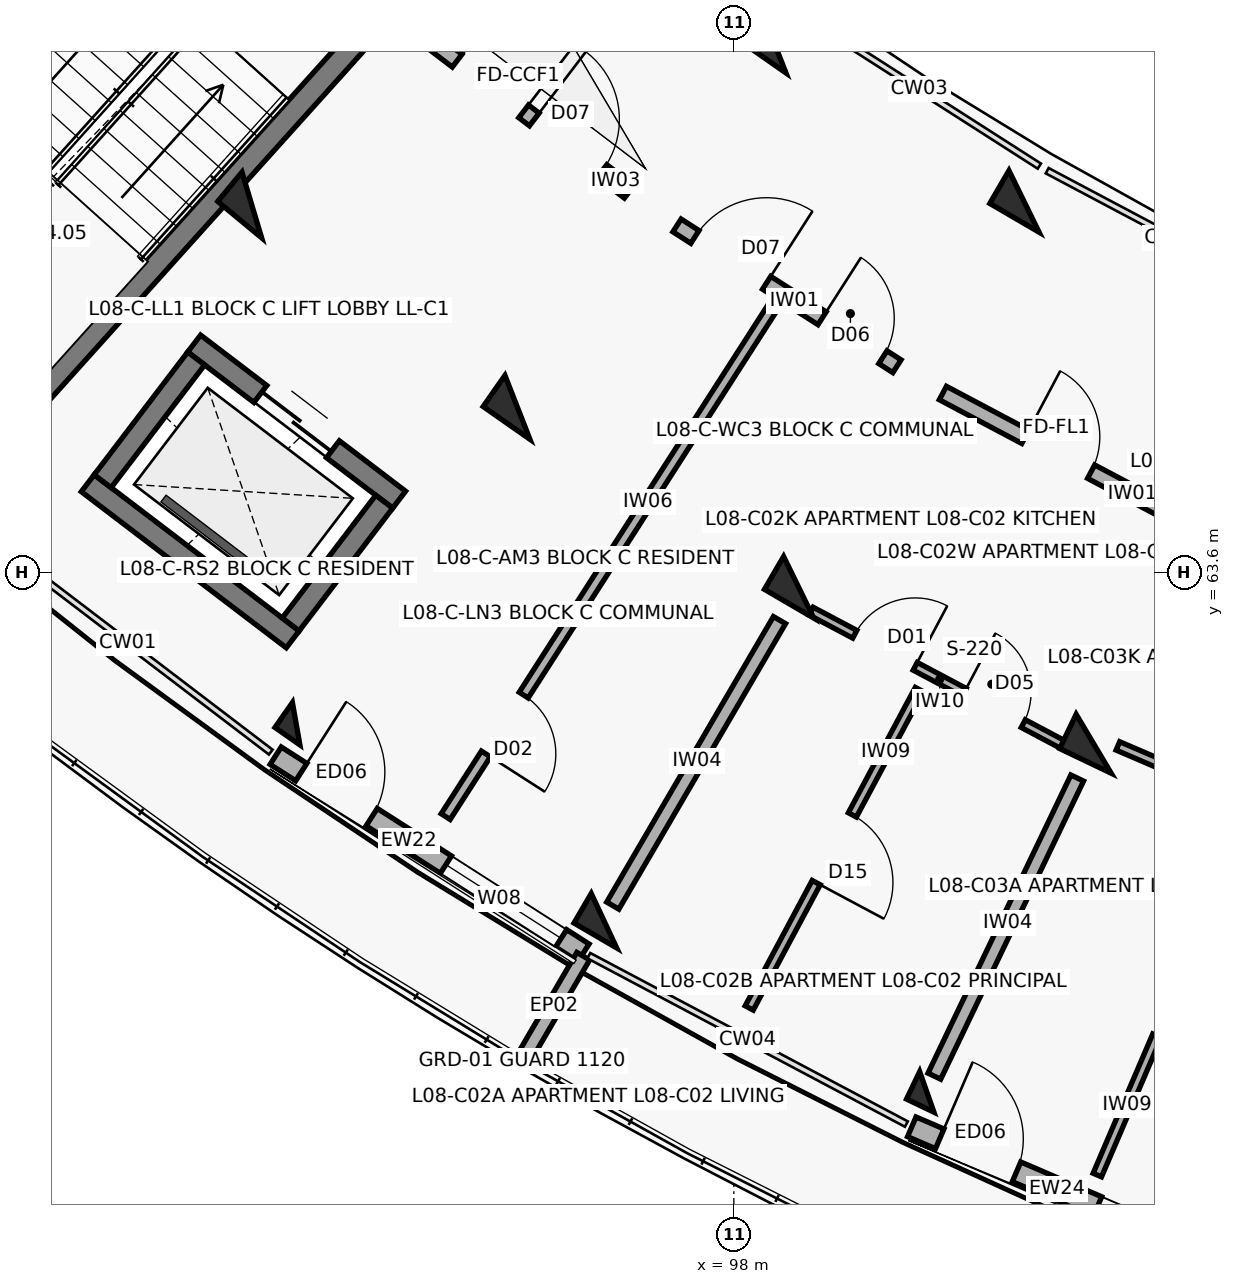
"""IFC4 building model, lengths in metres.
Left out: names, types, materials, properties, quantities, classifications, styles, units other than length and angle.
Written with IfcOpenShell. Run it as: python <this file> out.ifc"""

import sys

from ifc_helpers import new_model, si_unit, direction, frame, frame_2d, origin, origin_2d, place, context, subcontext, project, spatial, rectangle, extrude, element, fill, save


model = new_model("IFC4")
c1 = context("Model", 3, precision=1e-05, world=origin(), true_north=direction((0.0, 1.0)))
c2 = subcontext(c1, "Body", "Model", "MODEL_VIEW")
j1 = project(units=[si_unit("LENGTHUNIT", "METRE"), si_unit("PLANEANGLEUNIT", "RADIAN")], contexts=[c1])
p1 = place(None, origin())
s1 = spatial("IfcSite", under=j1, at=p1, CompositionType="ELEMENT")
p2 = place(p1, origin())
s2 = spatial("IfcBuilding", under=s1, at=p2, CompositionType="ELEMENT")
p3 = place(p2, frame((0.0, 0.0, 26.7)))
s3 = spatial("IfcBuildingStorey", under=s2, at=p3, CompositionType="ELEMENT", Elevation=26.7)
for number, where, z_axis, x_axis in (
    (1, (91.658, 68.43, 0.0), (0.0, 0.0, 1.0), (-0.638, -0.77, 0.0)),
    (2, (98.522, 70.587, 0.0), (0.0, 0.0, 1.0), (-0.573, -0.82, 0.0)),
    (3, (95.152, 65.768, 0.0), (0.0, 0.0, 1.0), (-0.573, -0.82, 0.0)),
):
    element("IfcColumn", number, at=place(p3, frame(where, z_axis=z_axis, x_axis=x_axis)), inside=s3, PredefinedType="COLUMN", context=c2, shape_type="SweptSolid", body=[
        extrude(rectangle(XDim=0.5, YDim=0.75, at=origin_2d()), origin(), (0.0, 0.0, 1.0), 3.1),
    ])
p4 = place(p3, frame((92.241, 61.605, 0.0), z_axis=(0.0, 0.0, 1.0), x_axis=(-0.573004420611, -0.819552276527, 0.0)))
e4 = element("IfcColumn", 4, at=p4, inside=s3, PredefinedType="COLUMN", context=c2, shape_type="SweptSolid", body=[
    extrude(rectangle(XDim=0.4, YDim=0.4, at=origin_2d()), origin(), (0.0, 0.0, 1.0), 3.1),
])
for number, where, z_axis, x_axis in (
    (5, (101.817, 68.478, 0.0), (0.0, 0.0, 1.0), (-0.504, -0.864, 0.0)),
    (6, (98.853, 63.4, 0.0), (0.0, 0.0, 1.0), (-0.504, -0.864, 0.0)),
):
    element("IfcColumn", number, at=place(p3, frame(where, z_axis=z_axis, x_axis=x_axis)), inside=s3, PredefinedType="COLUMN", context=c2, shape_type="SweptSolid", body=[
        extrude(rectangle(XDim=0.5, YDim=0.75, at=origin_2d()), origin(), (0.0, 0.0, 1.0), 3.1),
    ])
p5 = place(p3, frame((96.291, 59.013, 0.0), z_axis=(0.0, 0.0, 1.0), x_axis=(-0.504226211181, -0.863571611366, 0.0)))
e7 = element("IfcColumn", 7, at=p5, inside=s3, PredefinedType="COLUMN", context=c2, shape_type="SweptSolid", body=[
    extrude(rectangle(XDim=0.45, YDim=0.65, at=origin_2d()), origin(), (0.0, 0.0, 1.0), 3.1),
])
p6 = place(p3, frame((102.734, 61.341, 0.0), z_axis=(0.0, 0.0, 1.0), x_axis=(-0.432085748802, -0.901832526405, 0.0)))
e8 = element("IfcColumn", 8, at=p6, inside=s3, PredefinedType="COLUMN", context=c2, shape_type="SweptSolid", body=[
    extrude(rectangle(XDim=0.5, YDim=0.75, at=origin_2d()), origin(), (0.0, 0.0, 1.0), 3.1),
])
p7 = place(p3, frame((100.539, 56.76, 0.0), z_axis=(0.0, 0.0, 1.0), x_axis=(-0.432085748802, -0.901832526405, 0.0)))
e9 = element("IfcColumn", 9, at=p7, inside=s3, PredefinedType="COLUMN", context=c2, shape_type="SweptSolid", body=[
    extrude(rectangle(XDim=0.4, YDim=0.4, at=origin_2d()), origin(), (0.0, 0.0, 1.0), 3.1),
])
p8 = place(p3, frame((91.972, 61.184, 0.0), z_axis=(0.0, 0.0, 1.0), x_axis=(0.84226218024, -0.539068103061, 0.0)))
e10 = element("IfcWall", 10, at=p8, inside=s3, PredefinedType="SOLIDWALL", context=c2, shape_type="SweptSolid", body=[
    extrude(rectangle(XDim=4.809, YDim=0.272, at=frame_2d((2.404, 0.0))), origin(), (0.0, 0.0, 1.0), 2.25),
])
p9 = place(p8, frame((0.4, 0.0, 0.0)))
e11 = element("IfcOpeningElement", 11, at=p9, cuts=e10, PredefinedType="OPENING", context=c2, shape_type="SweptSolid", body=[
    extrude(rectangle(XDim=1.1, YDim=2.15, at=frame_2d((0.55, 1.075))), frame((0.0, 0.146, 0.0), z_axis=(0.0, -1.0, 0.0), x_axis=(1.0, 0.0, 0.0)), (0.0, 0.0, 1.0), 0.292),
])
p10 = place(p8, frame((2.659, 0.0, 0.35)))
e12 = element("IfcOpeningElement", 12, at=p10, cuts=e10, PredefinedType="OPENING", context=c2, shape_type="SweptSolid", body=[
    extrude(rectangle(XDim=1.8, YDim=1.65, at=frame_2d((0.9, 0.825))), frame((0.0, 0.146, 0.0), z_axis=(0.0, -1.0, 0.0), x_axis=(1.0, 0.0, 0.0)), (0.0, 0.0, 1.0), 0.292),
])
p11 = place(p3, frame((96.019, 58.547, 0.0), z_axis=(0.0, 0.0, 1.0), x_axis=(-0.504228145431, -0.863570481985, 0.0)))
e13 = element("IfcWall", 13, at=p11, inside=s3, PredefinedType="PARAPET", context=c2, shape_type="SweptSolid", body=[
    extrude(rectangle(XDim=1.53, YDim=0.195, at=frame_2d((0.765, 0.0))), origin(), (0.0, 0.0, 1.0), 2.25),
])
p12 = place(p3, frame((100.341, 56.301, 0.0), z_axis=(0.0, 0.0, 1.0), x_axis=(0.918737524932, -0.39486878869, 0.0)))
e14 = element("IfcWall", 14, at=p12, inside=s3, PredefinedType="SOLIDWALL", context=c2, shape_type="SweptSolid", body=[
    extrude(rectangle(XDim=4.809, YDim=0.282, at=frame_2d((2.405, 0.0))), origin(), (0.0, 0.0, 1.0), 2.25),
])
p13 = place(p12, frame((0.4, 0.0, 0.0)))
e15 = element("IfcOpeningElement", 15, at=p13, cuts=e14, PredefinedType="OPENING", context=c2, shape_type="SweptSolid", body=[
    extrude(rectangle(XDim=1.1, YDim=2.15, at=frame_2d((0.55, 1.075))), frame((0.0, 0.151, 0.0), z_axis=(0.0, -1.0, 0.0), x_axis=(1.0, 0.0, 0.0)), (0.0, 0.0, 1.0), 0.302),
])
p14 = place(p12, frame((2.659, 0.0, 0.35)))
e16 = element("IfcOpeningElement", 16, at=p14, cuts=e14, PredefinedType="OPENING", context=c2, shape_type="SweptSolid", body=[
    extrude(rectangle(XDim=1.8, YDim=1.65, at=frame_2d((0.9, 0.825))), frame((0.0, 0.151, 0.0), z_axis=(0.0, -1.0, 0.0), x_axis=(1.0, 0.0, 0.0)), (0.0, 0.0, 1.0), 0.302),
])
p15 = place(p3, frame((90.671, 73.287, 0.0), z_axis=(0.0, 0.0, 1.0), x_axis=(-0.668885797871, -0.743365179038, 0.0)))
e17 = element("IfcWall", 17, at=p15, inside=s3, PredefinedType="SHEAR", context=c2, shape_type="SweptSolid", body=[
    extrude(rectangle(XDim=7.69, YDim=0.3, at=frame_2d((3.845, 0.0))), origin(), (0.0, 0.0, 1.0), 3.1),
])
p16 = place(p3, frame((93.325, 70.899, 0.0), z_axis=(0.0, 0.0, 1.0), x_axis=(-0.668868253964, -0.743380964808, 0.0)))
e18 = element("IfcWall", 18, at=p16, inside=s3, PredefinedType="SHEAR", context=c2, shape_type="SweptSolid", body=[
    extrude(rectangle(XDim=7.69, YDim=0.3, at=frame_2d((3.845, 0.0))), origin(), (0.0, 0.0, 1.0), 3.1),
])
p17 = place(p3, frame((90.899, 66.607, 0.0), z_axis=(0.0, 0.0, 1.0), x_axis=(0.795439986025, -0.606032365994, 0.0)))
e19 = element("IfcWall", 19, at=p17, inside=s3, PredefinedType="SHEAR", context=c2, shape_type="SweptSolid", body=[
    extrude(rectangle(XDim=3.39, YDim=0.28, at=frame_2d((1.695, 0.0))), origin(), (0.0, 0.0, 1.0), 3.1),
])
p18 = place(p17, frame((1.095, 0.0, 0.0)))
e20 = element("IfcOpeningElement", 20, at=p18, cuts=e19, PredefinedType="OPENING", context=c2, shape_type="SweptSolid", body=[
    extrude(rectangle(XDim=1.2, YDim=2.15, at=frame_2d((0.6, 1.075))), frame((0.0, 0.15, 0.0), z_axis=(0.0, -1.0, 0.0), x_axis=(1.0, 0.0, 0.0)), (0.0, 0.0, 1.0), 0.3),
])
p19 = place(p3, frame((89.5, 64.77, 0.0), z_axis=(0.0, 0.0, 1.0), x_axis=(0.795474703455, -0.605986795371, 0.0)))
e21 = element("IfcWall", 21, at=p19, inside=s3, PredefinedType="SHEAR", context=c2, shape_type="SweptSolid", body=[
    extrude(rectangle(XDim=3.39, YDim=0.28, at=frame_2d((1.695, 0.0))), origin(), (0.0, 0.0, 1.0), 3.1),
])
p20 = place(p3, frame((90.926, 66.411, 0.0), z_axis=(0.0, 0.0, 1.0), x_axis=(-0.605948992168, -0.795503500238, 0.0)))
e22 = element("IfcWall", 22, at=p20, inside=s3, PredefinedType="SHEAR", context=c2, shape_type="SweptSolid", body=[
    extrude(rectangle(XDim=2.03, YDim=0.28, at=frame_2d((1.015, 0.0))), origin(), (0.0, 0.0, 1.0), 3.1),
])
p21 = place(p3, frame((93.4, 64.526, 0.0), z_axis=(0.0, 0.0, 1.0), x_axis=(-0.605891019062, -0.795547656033, 0.0)))
e23 = element("IfcWall", 23, at=p21, inside=s3, PredefinedType="SHEAR", context=c2, shape_type="SweptSolid", body=[
    extrude(rectangle(XDim=2.03, YDim=0.28, at=frame_2d((1.015, 0.0))), origin(), (0.0, 0.0, 1.0), 3.1),
])
p22 = place(p3, frame((94.001, 70.602, 0.0), z_axis=(0.0, 0.0, 1.0), x_axis=(0.795498026433, -0.605956178235, 0.0)))
e24 = element("IfcWall", 24, at=p22, inside=s3, PredefinedType="SOLIDWALL", context=c2, shape_type="SweptSolid", body=[
    extrude(rectangle(XDim=3.296, YDim=0.21, at=frame_2d((1.648, 0.0))), origin(), (0.0, 0.0, 1.0), 2.08),
])
p23 = place(p22, frame((0.45, 0.0, 0.0)))
e25 = element("IfcOpeningElement", 25, at=p23, cuts=e24, PredefinedType="OPENING", context=c2, shape_type="SweptSolid", body=[
    extrude(rectangle(XDim=1.1, YDim=2.15, at=frame_2d((0.55, 1.075))), frame((0.0, 0.115, 0.0), z_axis=(0.0, -1.0, 0.0), x_axis=(1.0, 0.0, 0.0)), (0.0, 0.0, 1.0), 0.23),
])
p24 = place(p22, frame((1.726, 0.0, 0.0)))
e26 = element("IfcOpeningElement", 26, at=p24, cuts=e24, PredefinedType="OPENING", context=c2, shape_type="SweptSolid", body=[
    extrude(rectangle(XDim=1.12, YDim=2.15, at=frame_2d((0.56, 1.075))), frame((0.0, 0.115, 0.0), z_axis=(0.0, -1.0, 0.0), x_axis=(1.0, 0.0, 0.0)), (0.0, 0.0, 1.0), 0.23),
])
p25 = place(p3, frame((97.252, 68.161, 0.0), z_axis=(0.0, 0.0, 1.0), x_axis=(0.842289466461, -0.53902546757, 0.0)))
e27 = element("IfcWall", 27, at=p25, inside=s3, PredefinedType="SOLIDWALL", context=c2, shape_type="SweptSolid", body=[
    extrude(rectangle(XDim=3.436, YDim=0.2, at=frame_2d((1.718, 0.0))), origin(), (0.0, 0.0, 1.0), 2.08),
])
p26 = place(p25, frame((0.28, 0.0, 0.0)))
e28 = element("IfcOpeningElement", 28, at=p26, cuts=e27, PredefinedType="OPENING", context=c2, shape_type="SweptSolid", body=[
    extrude(rectangle(XDim=1.12, YDim=2.15, at=frame_2d((0.56, 1.075))), frame((0.0, 0.11, 0.0), z_axis=(0.0, -1.0, 0.0), x_axis=(1.0, 0.0, 0.0)), (0.0, 0.0, 1.0), 0.22),
])
p27 = place(p25, frame((2.266, 0.0, 0.0)))
e29 = element("IfcOpeningElement", 29, at=p27, cuts=e27, PredefinedType="OPENING", context=c2, shape_type="SweptSolid", body=[
    extrude(rectangle(XDim=0.95, YDim=2.1, at=frame_2d((0.475, 1.05))), frame((0.0, 0.11, 0.0), z_axis=(0.0, -1.0, 0.0), x_axis=(1.0, 0.0, 0.0)), (0.0, 0.0, 1.0), 0.22),
])
p28 = place(p3, frame((98.504, 67.072, 0.0), z_axis=(0.0, 0.0, 1.0), x_axis=(-0.540338452216, -0.841447774408, 0.0)))
e30 = element("IfcWall", 30, at=p28, inside=s3, PredefinedType="PARTITIONING", context=c2, shape_type="SweptSolid", body=[
    extrude(rectangle(XDim=7.95, YDim=0.14, at=frame_2d((3.975, 0.0))), origin(), (0.0, 0.0, 1.0), 2.08),
])
p29 = place(p28, frame((6.05, 0.0, 0.0)))
e31 = element("IfcOpeningElement", 31, at=p29, cuts=e30, PredefinedType="OPENING", context=c2, shape_type="SweptSolid", body=[
    extrude(rectangle(XDim=0.92, YDim=2.1, at=frame_2d((0.46, 1.05))), frame((0.0, 0.08, 0.0), z_axis=(0.0, -1.0, 0.0), x_axis=(1.0, 0.0, 0.0)), (0.0, 0.0, 1.0), 0.16),
])
p30 = place(p3, frame((100.75, 65.956, 0.0), z_axis=(0.0, 0.0, 1.0), x_axis=(0.883440266101, -0.468543803963, 0.0)))
e32 = element("IfcWall", 32, at=p30, inside=s3, PredefinedType="SOLIDWALL", context=c2, shape_type="SweptSolid", body=[
    extrude(rectangle(XDim=3.436, YDim=0.2, at=frame_2d((1.718, 0.0))), origin(), (0.0, 0.0, 1.0), 2.08),
])
p31 = place(p30, frame((1.228, 0.0, 0.0)))
e33 = element("IfcOpeningElement", 33, at=p31, cuts=e32, PredefinedType="OPENING", context=c2, shape_type="SweptSolid", body=[
    extrude(rectangle(XDim=0.98, YDim=2.15, at=frame_2d((0.49, 1.075))), frame((0.0, 0.11, 0.0), z_axis=(0.0, -1.0, 0.0), x_axis=(1.0, 0.0, 0.0)), (0.0, 0.0, 1.0), 0.22),
])
p32 = place(p3, frame((99.017, 63.087, 0.0), z_axis=(0.0, 0.0, 1.0), x_axis=(0.883415075746, -0.468591297342, 0.0)))
e34 = element("IfcWall", 34, at=p32, inside=s3, PredefinedType="PARTITIONING", context=c2, shape_type="SweptSolid", body=[
    extrude(rectangle(XDim=3.81, YDim=0.115, at=frame_2d((1.905, 0.0))), origin(), (0.0, 0.0, 1.0), 2.08),
])
p33 = place(p32, frame((0.65, 0.0, 0.0)))
e35 = element("IfcOpeningElement", 35, at=p33, cuts=e34, PredefinedType="OPENING", context=c2, shape_type="SweptSolid", body=[
    extrude(rectangle(XDim=0.9, YDim=2.1, at=frame_2d((0.45, 1.05))), frame((0.0, 0.067, 0.0), z_axis=(0.0, -1.0, 0.0), x_axis=(1.0, 0.0, 0.0)), (0.0, 0.0, 1.0), 0.135),
])
p34 = place(p32, frame((2.28, 0.0, 0.0)))
e36 = element("IfcOpeningElement", 36, at=p34, cuts=e34, PredefinedType="OPENING", context=c2, shape_type="SweptSolid", body=[
    extrude(rectangle(XDim=0.88, YDim=2.1, at=frame_2d((0.44, 1.05))), frame((0.0, 0.067, 0.0), z_axis=(0.0, -1.0, 0.0), x_axis=(1.0, 0.0, 0.0)), (0.0, 0.0, 1.0), 0.135),
])
p35 = place(p3, frame((100.44, 62.054, 0.0), z_axis=(0.0, 0.0, 1.0), x_axis=(-0.471207016772, -0.882022645596, 0.0)))
e37 = element("IfcWall", 37, at=p35, inside=s3, PredefinedType="PARTITIONING", context=c2, shape_type="SweptSolid", body=[
    extrude(rectangle(XDim=4.75, YDim=0.12, at=frame_2d((2.375, 0.0))), origin(), (0.0, 0.0, 1.0), 2.08),
])
p36 = place(p35, frame((1.87, 0.0, 0.0)))
e38 = element("IfcOpeningElement", 38, at=p36, cuts=e37, PredefinedType="OPENING", context=c2, shape_type="SweptSolid", body=[
    extrude(rectangle(XDim=1.01, YDim=2.1, at=frame_2d((0.505, 1.05))), frame((0.0, 0.07, 0.0), z_axis=(0.0, -1.0, 0.0), x_axis=(1.0, 0.0, 0.0)), (0.0, 0.0, 1.0), 0.14),
])
p37 = place(p3, frame((98.601, 62.968, 0.0), z_axis=(0.0, 0.0, 1.0), x_axis=(-0.504216452091, -0.863577309475, 0.0)))
e39 = element("IfcWall", 39, at=p37, inside=s3, PredefinedType="SOLIDWALL", context=c2, shape_type="SweptSolid", body=[
    extrude(rectangle(XDim=4.35, YDim=0.185, at=frame_2d((2.175, 0.0))), origin(), (0.0, 0.0, 1.0), 2.08),
])
p38 = place(p3, frame((103.052, 61.313, 0.0), z_axis=(0.0, 0.0, 1.0), x_axis=(0.918714121981, -0.39492323567, 0.0)))
e40 = element("IfcWall", 40, at=p38, inside=s3, PredefinedType="PARTITIONING", context=c2, shape_type="SweptSolid", body=[
    extrude(rectangle(XDim=3.785, YDim=0.12, at=frame_2d((1.893, 0.0))), origin(), (0.0, 0.0, 1.0), 2.08),
])
p39 = place(p38, frame((0.65, 0.0, 0.0)))
e41 = element("IfcOpeningElement", 41, at=p39, cuts=e40, PredefinedType="OPENING", context=c2, shape_type="SweptSolid", body=[
    extrude(rectangle(XDim=0.9, YDim=2.1, at=frame_2d((0.45, 1.05))), frame((0.0, 0.07, 0.0), z_axis=(0.0, -1.0, 0.0), x_axis=(1.0, 0.0, 0.0)), (0.0, 0.0, 1.0), 0.14),
])
p40 = place(p38, frame((2.255, 0.0, 0.0)))
e42 = element("IfcOpeningElement", 42, at=p40, cuts=e40, PredefinedType="OPENING", context=c2, shape_type="SweptSolid", body=[
    extrude(rectangle(XDim=0.88, YDim=2.1, at=frame_2d((0.44, 1.05))), frame((0.0, 0.07, 0.0), z_axis=(0.0, -1.0, 0.0), x_axis=(1.0, 0.0, 0.0)), (0.0, 0.0, 1.0), 0.14),
])
p41 = place(p3, frame((104.769, 60.309, 0.0), z_axis=(0.0, 0.0, 1.0), x_axis=(-0.393522505308, -0.919314982917, 0.0)))
e43 = element("IfcWall", 43, at=p41, inside=s3, PredefinedType="PARTITIONING", context=c2, shape_type="SweptSolid", body=[
    extrude(rectangle(XDim=5.05, YDim=0.12, at=frame_2d((2.525, 0.0))), origin(), (0.0, 0.0, 1.0), 2.08),
])
p42 = place(p41, frame((1.995, 0.0, 0.0)))
e44 = element("IfcOpeningElement", 44, at=p42, cuts=e43, PredefinedType="OPENING", context=c2, shape_type="SweptSolid", body=[
    extrude(rectangle(XDim=1.06, YDim=2.1, at=frame_2d((0.53, 1.05))), frame((0.0, 0.07, 0.0), z_axis=(0.0, -1.0, 0.0), x_axis=(1.0, 0.0, 0.0)), (0.0, 0.0, 1.0), 0.14),
])
p43 = place(p3, frame((102.518, 60.89, 0.0), z_axis=(0.0, 0.0, 1.0), x_axis=(-0.432108769108, -0.901821496561, 0.0)))
e45 = element("IfcWall", 45, at=p43, inside=s3, PredefinedType="SOLIDWALL", context=c2, shape_type="SweptSolid", body=[
    extrude(rectangle(XDim=4.35, YDim=0.185, at=frame_2d((2.175, 0.0))), origin(), (0.0, 0.0, 1.0), 2.08),
])
p44 = place(p9, origin())
e46 = element("IfcDoor", 46, at=p44, inside=s3, OperationType="SINGLE_SWING_LEFT", PredefinedType="DOOR", context=c2, shape_type="SweptSolid", body=[
    extrude(rectangle(XDim=1.1, YDim=2.15, at=frame_2d((0.55, 1.075))), frame((0.0, 0.025, 0.0), z_axis=(0.0, -1.0, 0.0), x_axis=(1.0, 0.0, 0.0)), (0.0, 0.0, 1.0), 0.05),
])
fill(e11, e46)
p45 = place(p10, origin())
e47 = element("IfcWindow", 47, at=p45, inside=s3, PartitioningType="TRIPLE_PANEL_VERTICAL", PredefinedType="WINDOW", context=c2, shape_type="SweptSolid", body=[
    extrude(rectangle(XDim=1.8, YDim=1.65, at=frame_2d((0.9, 0.825))), frame((0.0, 0.03, 0.0), z_axis=(0.0, -1.0, 0.0), x_axis=(1.0, 0.0, 0.0)), (0.0, 0.0, 1.0), 0.06),
])
fill(e12, e47)
p46 = place(p13, origin())
e48 = element("IfcDoor", 48, at=p46, inside=s3, OperationType="SINGLE_SWING_LEFT", PredefinedType="DOOR", context=c2, shape_type="SweptSolid", body=[
    extrude(rectangle(XDim=1.1, YDim=2.15, at=frame_2d((0.55, 1.075))), frame((0.0, 0.025, 0.0), z_axis=(0.0, -1.0, 0.0), x_axis=(1.0, 0.0, 0.0)), (0.0, 0.0, 1.0), 0.05),
])
fill(e15, e48)
p47 = place(p18, origin())
e49 = element("IfcDoor", 49, at=p47, inside=s3, OperationType="DOUBLE_DOOR_SLIDING", PredefinedType="DOOR", context=c2, shape_type="SweptSolid", body=[
    extrude(rectangle(XDim=1.2, YDim=2.15, at=frame_2d((0.6, 1.075))), frame((0.0, 0.025, 0.0), z_axis=(0.0, -1.0, 0.0), x_axis=(1.0, 0.0, 0.0)), (0.0, 0.0, 1.0), 0.05),
])
fill(e20, e49)
p48 = place(p23, origin())
e50 = element("IfcDoor", 50, at=p48, inside=s3, OperationType="SINGLE_SWING_RIGHT", PredefinedType="DOOR", context=c2, shape_type="SweptSolid", body=[
    extrude(rectangle(XDim=1.1, YDim=2.15, at=frame_2d((0.55, 1.075))), frame((0.0, 0.025, 0.0), z_axis=(0.0, -1.0, 0.0), x_axis=(1.0, 0.0, 0.0)), (0.0, 0.0, 1.0), 0.05),
])
fill(e25, e50)
p49 = place(p24, origin())
e51 = element("IfcDoor", 51, at=p49, inside=s3, OperationType="SINGLE_SWING_LEFT", PredefinedType="DOOR", context=c2, shape_type="SweptSolid", body=[
    extrude(rectangle(XDim=1.12, YDim=2.15, at=frame_2d((0.56, 1.075))), frame((0.0, 0.025, 0.0), z_axis=(0.0, -1.0, 0.0), x_axis=(1.0, 0.0, 0.0)), (0.0, 0.0, 1.0), 0.05),
])
fill(e26, e51)
p50 = place(p26, origin())
e52 = element("IfcDoor", 52, at=p50, inside=s3, OperationType="SINGLE_SWING_RIGHT", PredefinedType="DOOR", context=c2, shape_type="SweptSolid", body=[
    extrude(rectangle(XDim=1.12, YDim=2.15, at=frame_2d((0.56, 1.075))), frame((0.0, 0.025, 0.0), z_axis=(0.0, -1.0, 0.0), x_axis=(1.0, 0.0, 0.0)), (0.0, 0.0, 1.0), 0.05),
])
fill(e28, e52)
p51 = place(p27, origin())
e53 = element("IfcDoor", 53, at=p51, inside=s3, OperationType="SINGLE_SWING_LEFT", PredefinedType="DOOR", context=c2, shape_type="SweptSolid", body=[
    extrude(rectangle(XDim=0.95, YDim=2.1, at=frame_2d((0.475, 1.05))), frame((0.0, 0.025, 0.0), z_axis=(0.0, -1.0, 0.0), x_axis=(1.0, 0.0, 0.0)), (0.0, 0.0, 1.0), 0.05),
])
fill(e29, e53)
p52 = place(p29, origin())
e54 = element("IfcDoor", 54, at=p52, inside=s3, OperationType="SINGLE_SWING_RIGHT", PredefinedType="DOOR", context=c2, shape_type="SweptSolid", body=[
    extrude(rectangle(XDim=0.92, YDim=2.1, at=frame_2d((0.46, 1.05))), frame((0.0, 0.025, 0.0), z_axis=(0.0, -1.0, 0.0), x_axis=(1.0, 0.0, 0.0)), (0.0, 0.0, 1.0), 0.05),
])
fill(e31, e54)
p53 = place(p31, origin())
e55 = element("IfcDoor", 55, at=p53, inside=s3, OperationType="SINGLE_SWING_LEFT", PredefinedType="DOOR", context=c2, shape_type="SweptSolid", body=[
    extrude(rectangle(XDim=0.98, YDim=2.15, at=frame_2d((0.49, 1.075))), frame((0.0, 0.025, 0.0), z_axis=(0.0, -1.0, 0.0), x_axis=(1.0, 0.0, 0.0)), (0.0, 0.0, 1.0), 0.05),
])
fill(e33, e55)
p54 = place(p33, origin())
e56 = element("IfcDoor", 56, at=p54, inside=s3, OperationType="SINGLE_SWING_RIGHT", PredefinedType="DOOR", context=c2, shape_type="SweptSolid", body=[
    extrude(rectangle(XDim=0.9, YDim=2.1, at=frame_2d((0.45, 1.05))), frame((0.0, 0.025, 0.0), z_axis=(0.0, -1.0, 0.0), x_axis=(1.0, 0.0, 0.0)), (0.0, 0.0, 1.0), 0.05),
])
fill(e35, e56)
p55 = place(p34, origin())
e57 = element("IfcDoor", 57, at=p55, inside=s3, OperationType="SINGLE_SWING_LEFT", PredefinedType="DOOR", context=c2, shape_type="SweptSolid", body=[
    extrude(rectangle(XDim=0.88, YDim=2.1, at=frame_2d((0.44, 1.05))), frame((0.0, 0.025, 0.0), z_axis=(0.0, -1.0, 0.0), x_axis=(1.0, 0.0, 0.0)), (0.0, 0.0, 1.0), 0.05),
])
fill(e36, e57)
p56 = place(p36, origin())
e58 = element("IfcDoor", 58, at=p56, inside=s3, OperationType="SINGLE_SWING_RIGHT", PredefinedType="DOOR", context=c2, shape_type="SweptSolid", body=[
    extrude(rectangle(XDim=1.01, YDim=2.1, at=frame_2d((0.505, 1.05))), frame((0.0, 0.025, 0.0), z_axis=(0.0, -1.0, 0.0), x_axis=(1.0, 0.0, 0.0)), (0.0, 0.0, 1.0), 0.05),
])
fill(e38, e58)
save(model, sys.argv[1])
